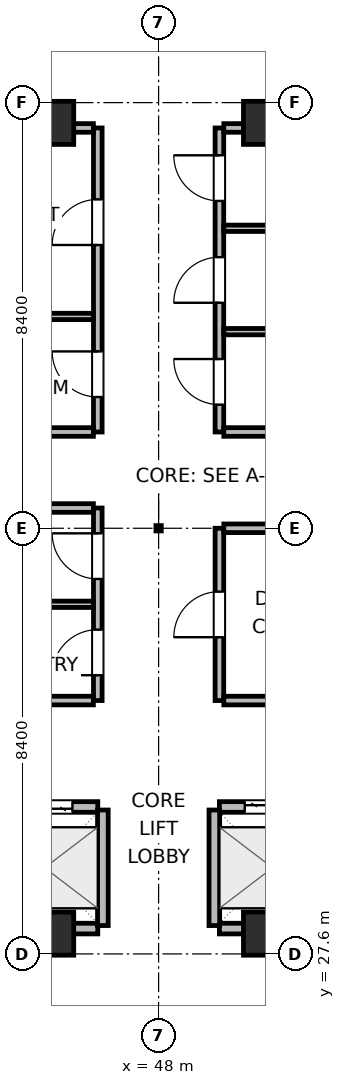
"""IFC4 building model, lengths in metres.
Left out: names, types, materials, properties, quantities, classifications, styles, units other than length and angle.
Written with IfcOpenShell. Run it as: python <this file> out.ifc"""

import sys

from ifc_helpers import new_model, si_unit, direction, frame, frame_2d, origin, origin_2d, place, context, subcontext, project, spatial, rectangle, extrude, element, fill, save


model = new_model("IFC4")
c1 = context("Model", 3, precision=1e-05, world=origin(), true_north=direction((0.0, 1.0)))
c2 = subcontext(c1, "Body", "Model", "MODEL_VIEW")
j1 = project(units=[si_unit("LENGTHUNIT", "METRE"), si_unit("PLANEANGLEUNIT", "RADIAN")], contexts=[c1])
p1 = place(None, origin())
s1 = spatial("IfcSite", under=j1, at=p1, CompositionType="ELEMENT")
p2 = place(p1, origin())
s2 = spatial("IfcBuilding", under=s1, at=p2, CompositionType="ELEMENT")
p3 = place(p2, frame((0.0, 0.0, 56.7)))
s3 = spatial("IfcBuildingStorey", under=s2, at=p3, CompositionType="ELEMENT", Elevation=56.7)
for number, where, z_axis, x_axis in (
    (1, (45.9, 28.0, 0.0), (0.0, 0.0, 1.0), (1.0, 0.0, 0.0)),
    (2, (50.1, 28.0, 0.0), (0.0, 0.0, 1.0), (1.0, 0.0, 0.0)),
    (3, (45.9, 44.0, 0.0), (0.0, 0.0, 1.0), (1.0, 0.0, 0.0)),
    (4, (50.1, 44.0, 0.0), (0.0, 0.0, 1.0), (1.0, 0.0, 0.0)),
):
    element("IfcColumn", number, at=place(p3, frame(where, z_axis=z_axis, x_axis=x_axis)), inside=s3, PredefinedType="COLUMN", context=c2, shape_type="SweptSolid", body=[
        extrude(rectangle(XDim=0.85, YDim=0.85, at=origin_2d()), origin(), (0.0, 0.0, 1.0), 3.9),
    ])
p4 = place(p3, frame((44.7, 30.5, 0.0), z_axis=(0.0, 0.0, 1.0), x_axis=(1.0, 0.0, 0.0)))
e5 = element("IfcWall", 5, at=p4, inside=s3, PredefinedType="PARTITIONING", context=c2, shape_type="SweptSolid", body=[
    extrude(rectangle(XDim=2.1, YDim=0.21, at=frame_2d((1.05, 0.0))), origin(), (0.0, 0.0, 1.0), 3.64),
])
p5 = place(p4, frame((0.5, 0.0, 0.0)))
e6 = element("IfcOpeningElement", 6, at=p5, cuts=e5, PredefinedType="OPENING", context=c2, shape_type="SweptSolid", body=[
    extrude(rectangle(XDim=1.1, YDim=2.04, at=frame_2d((0.55, 1.02))), frame((0.0, 0.115, 0.0), z_axis=(0.0, -1.0, 0.0), x_axis=(1.0, 0.0, 0.0)), (0.0, 0.0, 1.0), 0.23),
])
p6 = place(p3, frame((44.7, 28.1, 0.0), z_axis=(0.0, 0.0, 1.0), x_axis=(1.0, 0.0, 0.0)))
e7 = element("IfcWall", 7, at=p6, inside=s3, PredefinedType="PARTITIONING", context=c2, shape_type="SweptSolid", body=[
    extrude(rectangle(XDim=2.1, YDim=0.21, at=frame_2d((1.05, 0.0))), origin(), (0.0, 0.0, 1.0), 2.525),
])
p7 = place(p3, frame((46.9, 28.16, 0.0), z_axis=(0.0, 0.0, 1.0), x_axis=(0.0, 1.0, 0.0)))
e8 = element("IfcWall", 8, at=p7, inside=s3, PredefinedType="PARTITIONING", context=c2, shape_type="SweptSolid", body=[
    extrude(rectangle(XDim=2.28, YDim=0.21, at=frame_2d((1.14, 0.0))), origin(), (0.0, 0.0, 1.0), 3.64),
])
p8 = place(p3, frame((49.2, 30.5, 0.0), z_axis=(0.0, 0.0, 1.0), x_axis=(1.0, 0.0, 0.0)))
e9 = element("IfcWall", 9, at=p8, inside=s3, PredefinedType="PARTITIONING", context=c2, shape_type="SweptSolid", body=[
    extrude(rectangle(XDim=2.1, YDim=0.21, at=frame_2d((1.05, 0.0))), origin(), (0.0, 0.0, 1.0), 3.64),
])
p9 = place(p8, frame((0.5, 0.0, 0.0)))
e10 = element("IfcOpeningElement", 10, at=p9, cuts=e9, PredefinedType="OPENING", context=c2, shape_type="SweptSolid", body=[
    extrude(rectangle(XDim=1.1, YDim=2.04, at=frame_2d((0.55, 1.02))), frame((0.0, 0.115, 0.0), z_axis=(0.0, -1.0, 0.0), x_axis=(1.0, 0.0, 0.0)), (0.0, 0.0, 1.0), 0.23),
])
p10 = place(p3, frame((49.2, 28.1, 0.0), z_axis=(0.0, 0.0, 1.0), x_axis=(1.0, 0.0, 0.0)))
e11 = element("IfcWall", 11, at=p10, inside=s3, PredefinedType="PARTITIONING", context=c2, shape_type="SweptSolid", body=[
    extrude(rectangle(XDim=2.1, YDim=0.21, at=frame_2d((1.05, 0.0))), origin(), (0.0, 0.0, 1.0), 2.525),
])
p11 = place(p3, frame((49.1, 28.16, 0.0), z_axis=(0.0, 0.0, 1.0), x_axis=(0.0, 1.0, 0.0)))
e12 = element("IfcWall", 12, at=p11, inside=s3, PredefinedType="PARTITIONING", context=c2, shape_type="SweptSolid", body=[
    extrude(rectangle(XDim=2.28, YDim=0.21, at=frame_2d((1.14, 0.0))), origin(), (0.0, 0.0, 1.0), 3.64),
])
p12 = place(p3, frame((46.8, 32.6, 0.0), z_axis=(0.0, 0.0, 1.0), x_axis=(0.0, 1.0, 0.0)))
e13 = element("IfcWall", 13, at=p12, inside=s3, PredefinedType="PARTITIONING", context=c2, shape_type="SweptSolid", body=[
    extrude(rectangle(XDim=3.8, YDim=0.17, at=frame_2d((1.9, 0.0))), origin(), (0.0, 0.0, 1.0), 3.64),
])
p13 = place(p12, frame((0.5, 0.0, 0.0)))
e14 = element("IfcOpeningElement", 14, at=p13, cuts=e13, PredefinedType="OPENING", context=c2, shape_type="SweptSolid", body=[
    extrude(rectangle(XDim=0.9, YDim=2.02, at=frame_2d((0.45, 1.01))), frame((0.0, 0.095, 0.0), z_axis=(0.0, -1.0, 0.0), x_axis=(1.0, 0.0, 0.0)), (0.0, 0.0, 1.0), 0.19),
])
p14 = place(p12, frame((2.4, 0.0, 0.0)))
e15 = element("IfcOpeningElement", 15, at=p14, cuts=e13, PredefinedType="OPENING", context=c2, shape_type="SweptSolid", body=[
    extrude(rectangle(XDim=0.9, YDim=2.02, at=frame_2d((0.45, 1.01))), frame((0.0, 0.095, 0.0), z_axis=(0.0, -1.0, 0.0), x_axis=(1.0, 0.0, 0.0)), (0.0, 0.0, 1.0), 0.19),
])
for number, where, z_axis, x_axis in (
    (16, (43.8, 32.6, 0.0), (0.0, 0.0, 1.0), (1.0, 0.0, 0.0)),
    (17, (43.8, 36.4, 0.0), (0.0, 0.0, 1.0), (1.0, 0.0, 0.0)),
):
    element("IfcWall", number, at=place(p3, frame(where, z_axis=z_axis, x_axis=x_axis)), inside=s3, PredefinedType="PARTITIONING", context=c2, shape_type="SweptSolid", body=[
        extrude(rectangle(XDim=2.913, YDim=0.17, at=frame_2d((1.457, 0.0))), origin(), (0.0, 0.0, 1.0), 3.64),
    ])
p15 = place(p3, frame((43.8, 34.5, 0.0), z_axis=(0.0, 0.0, 1.0), x_axis=(1.0, 0.0, 0.0)))
e18 = element("IfcWall", 18, at=p15, inside=s3, PredefinedType="PARTITIONING", context=c2, shape_type="SweptSolid", body=[
    extrude(rectangle(XDim=2.913, YDim=0.125, at=frame_2d((1.457, 0.0))), origin(), (0.0, 0.0, 1.0), 3.64),
])
p16 = place(p3, frame((49.2, 32.6, 0.0), z_axis=(0.0, 0.0, 1.0), x_axis=(0.0, 1.0, 0.0)))
e19 = element("IfcWall", 19, at=p16, inside=s3, PredefinedType="PARTITIONING", context=c2, shape_type="SweptSolid", body=[
    extrude(rectangle(XDim=3.4, YDim=0.17, at=frame_2d((1.7, 0.0))), origin(), (0.0, 0.0, 1.0), 3.64),
])
p17 = place(p16, frame((1.25, 0.0, 0.0)))
e20 = element("IfcOpeningElement", 20, at=p17, cuts=e19, PredefinedType="OPENING", context=c2, shape_type="SweptSolid", body=[
    extrude(rectangle(XDim=0.9, YDim=2.02, at=frame_2d((0.45, 1.01))), frame((0.0, 0.095, 0.0), z_axis=(0.0, -1.0, 0.0), x_axis=(1.0, 0.0, 0.0)), (0.0, 0.0, 1.0), 0.19),
])
for number, where, z_axis, x_axis in (
    (21, (49.287, 32.6, 0.0), (0.0, 0.0, 1.0), (1.0, 0.0, 0.0)),
    (22, (49.287, 36.0, 0.0), (0.0, 0.0, 1.0), (1.0, 0.0, 0.0)),
):
    element("IfcWall", number, at=place(p3, frame(where, z_axis=z_axis, x_axis=x_axis)), inside=s3, PredefinedType="PARTITIONING", context=c2, shape_type="SweptSolid", body=[
        extrude(rectangle(XDim=2.913, YDim=0.17, at=frame_2d((1.457, 0.0))), origin(), (0.0, 0.0, 1.0), 3.64),
    ])
p18 = place(p3, frame((46.8, 37.9, 0.0), z_axis=(0.0, 0.0, 1.0), x_axis=(0.0, 1.0, 0.0)))
e23 = element("IfcWall", 23, at=p18, inside=s3, PredefinedType="PARTITIONING", context=c2, shape_type="SweptSolid", body=[
    extrude(rectangle(XDim=6.0, YDim=0.17, at=frame_2d((3.0, 0.0))), origin(), (0.0, 0.0, 1.0), 3.64),
])
p19 = place(p18, frame((0.69, 0.0, 0.0)))
e24 = element("IfcOpeningElement", 24, at=p19, cuts=e23, PredefinedType="OPENING", context=c2, shape_type="SweptSolid", body=[
    extrude(rectangle(XDim=0.9, YDim=2.02, at=frame_2d((0.45, 1.01))), frame((0.0, 0.095, 0.0), z_axis=(0.0, -1.0, 0.0), x_axis=(1.0, 0.0, 0.0)), (0.0, 0.0, 1.0), 0.19),
])
p20 = place(p18, frame((3.69, 0.0, 0.0)))
e25 = element("IfcOpeningElement", 25, at=p20, cuts=e23, PredefinedType="OPENING", context=c2, shape_type="SweptSolid", body=[
    extrude(rectangle(XDim=0.9, YDim=2.02, at=frame_2d((0.45, 1.01))), frame((0.0, 0.095, 0.0), z_axis=(0.0, -1.0, 0.0), x_axis=(1.0, 0.0, 0.0)), (0.0, 0.0, 1.0), 0.19),
])
p21 = place(p3, frame((42.5, 37.9, 0.0), z_axis=(0.0, 0.0, 1.0), x_axis=(1.0, 0.0, 0.0)))
e26 = element("IfcWall", 26, at=p21, inside=s3, PredefinedType="PARTITIONING", context=c2, shape_type="SweptSolid", body=[
    extrude(rectangle(XDim=4.213, YDim=0.17, at=frame_2d((2.106, 0.0))), origin(), (0.0, 0.0, 1.0), 3.64),
])
p22 = place(p3, frame((42.5, 43.9, 0.0), z_axis=(0.0, 0.0, 1.0), x_axis=(1.0, 0.0, 0.0)))
e27 = element("IfcWall", 27, at=p22, inside=s3, PredefinedType="PARTITIONING", context=c2, shape_type="SweptSolid", body=[
    extrude(rectangle(XDim=4.213, YDim=0.17, at=frame_2d((2.106, 0.0))), origin(), (0.0, 0.0, 1.0), 2.525),
])
p23 = place(p3, frame((42.5, 40.18, 0.0), z_axis=(0.0, 0.0, 1.0), x_axis=(1.0, 0.0, 0.0)))
e28 = element("IfcWall", 28, at=p23, inside=s3, PredefinedType="PARTITIONING", context=c2, shape_type="SweptSolid", body=[
    extrude(rectangle(XDim=4.213, YDim=0.125, at=frame_2d((2.106, 0.0))), origin(), (0.0, 0.0, 1.0), 3.64),
])
p24 = place(p3, frame((49.2, 37.9, 0.0), z_axis=(0.0, 0.0, 1.0), x_axis=(0.0, 1.0, 0.0)))
e29 = element("IfcWall", 29, at=p24, inside=s3, PredefinedType="PARTITIONING", context=c2, shape_type="SweptSolid", body=[
    extrude(rectangle(XDim=6.0, YDim=0.17, at=frame_2d((3.0, 0.0))), origin(), (0.0, 0.0, 1.0), 3.64),
])
p25 = place(p24, frame((0.54, 0.0, 0.0)))
e30 = element("IfcOpeningElement", 30, at=p25, cuts=e29, PredefinedType="OPENING", context=c2, shape_type="SweptSolid", body=[
    extrude(rectangle(XDim=0.9, YDim=2.02, at=frame_2d((0.45, 1.01))), frame((0.0, 0.095, 0.0), z_axis=(0.0, -1.0, 0.0), x_axis=(1.0, 0.0, 0.0)), (0.0, 0.0, 1.0), 0.19),
])
p26 = place(p24, frame((2.55, 0.0, 0.0)))
e31 = element("IfcOpeningElement", 31, at=p26, cuts=e29, PredefinedType="OPENING", context=c2, shape_type="SweptSolid", body=[
    extrude(rectangle(XDim=0.9, YDim=2.02, at=frame_2d((0.45, 1.01))), frame((0.0, 0.095, 0.0), z_axis=(0.0, -1.0, 0.0), x_axis=(1.0, 0.0, 0.0)), (0.0, 0.0, 1.0), 0.19),
])
p27 = place(p24, frame((4.56, 0.0, 0.0)))
e32 = element("IfcOpeningElement", 32, at=p27, cuts=e29, PredefinedType="OPENING", context=c2, shape_type="SweptSolid", body=[
    extrude(rectangle(XDim=0.9, YDim=2.02, at=frame_2d((0.45, 1.01))), frame((0.0, 0.095, 0.0), z_axis=(0.0, -1.0, 0.0), x_axis=(1.0, 0.0, 0.0)), (0.0, 0.0, 1.0), 0.19),
])
p28 = place(p3, frame((49.287, 37.9, 0.0), z_axis=(0.0, 0.0, 1.0), x_axis=(1.0, 0.0, 0.0)))
e33 = element("IfcWall", 33, at=p28, inside=s3, PredefinedType="PARTITIONING", context=c2, shape_type="SweptSolid", body=[
    extrude(rectangle(XDim=4.113, YDim=0.17, at=frame_2d((2.056, 0.0))), origin(), (0.0, 0.0, 1.0), 3.64),
])
p29 = place(p3, frame((49.287, 43.9, 0.0), z_axis=(0.0, 0.0, 1.0), x_axis=(1.0, 0.0, 0.0)))
e34 = element("IfcWall", 34, at=p29, inside=s3, PredefinedType="PARTITIONING", context=c2, shape_type="SweptSolid", body=[
    extrude(rectangle(XDim=4.113, YDim=0.17, at=frame_2d((2.056, 0.0))), origin(), (0.0, 0.0, 1.0), 2.525),
])
for number, where, z_axis, x_axis in (
    (35, (49.287, 39.88, 0.0), (0.0, 0.0, 1.0), (1.0, 0.0, 0.0)),
    (36, (49.287, 41.92, 0.0), (0.0, 0.0, 1.0), (1.0, 0.0, 0.0)),
):
    element("IfcWall", number, at=place(p3, frame(where, z_axis=z_axis, x_axis=x_axis)), inside=s3, PredefinedType="PARTITIONING", context=c2, shape_type="SweptSolid", body=[
        extrude(rectangle(XDim=4.113, YDim=0.125, at=frame_2d((2.056, 0.0))), origin(), (0.0, 0.0, 1.0), 3.64),
    ])
p30 = place(p5, origin())
e37 = element("IfcDoor", 37, at=p30, inside=s3, OperationType="DOUBLE_DOOR_SLIDING", PredefinedType="DOOR", context=c2, shape_type="SweptSolid", body=[
    extrude(rectangle(XDim=1.1, YDim=2.04, at=frame_2d((0.55, 1.02))), frame((0.0, 0.025, 0.0), z_axis=(0.0, -1.0, 0.0), x_axis=(1.0, 0.0, 0.0)), (0.0, 0.0, 1.0), 0.05),
])
fill(e6, e37)
p31 = place(p9, origin())
e38 = element("IfcDoor", 38, at=p31, inside=s3, OperationType="DOUBLE_DOOR_SLIDING", PredefinedType="DOOR", context=c2, shape_type="SweptSolid", body=[
    extrude(rectangle(XDim=1.1, YDim=2.04, at=frame_2d((0.55, 1.02))), frame((0.0, 0.025, 0.0), z_axis=(0.0, -1.0, 0.0), x_axis=(1.0, 0.0, 0.0)), (0.0, 0.0, 1.0), 0.05),
])
fill(e10, e38)
p32 = place(p13, origin())
e39 = element("IfcDoor", 39, at=p32, inside=s3, OperationType="SINGLE_SWING_LEFT", PredefinedType="DOOR", context=c2, shape_type="SweptSolid", body=[
    extrude(rectangle(XDim=0.9, YDim=2.02, at=frame_2d((0.45, 1.01))), frame((0.0, 0.025, 0.0), z_axis=(0.0, -1.0, 0.0), x_axis=(1.0, 0.0, 0.0)), (0.0, 0.0, 1.0), 0.05),
])
fill(e14, e39)
p33 = place(p14, origin())
e40 = element("IfcDoor", 40, at=p33, inside=s3, OperationType="SINGLE_SWING_RIGHT", PredefinedType="DOOR", context=c2, shape_type="SweptSolid", body=[
    extrude(rectangle(XDim=0.9, YDim=2.02, at=frame_2d((0.45, 1.01))), frame((0.0, 0.025, 0.0), z_axis=(0.0, -1.0, 0.0), x_axis=(1.0, 0.0, 0.0)), (0.0, 0.0, 1.0), 0.05),
])
fill(e15, e40)
p34 = place(p17, origin())
e41 = element("IfcDoor", 41, at=p34, inside=s3, OperationType="SINGLE_SWING_LEFT", PredefinedType="DOOR", context=c2, shape_type="SweptSolid", body=[
    extrude(rectangle(XDim=0.9, YDim=2.02, at=frame_2d((0.45, 1.01))), frame((0.0, 0.025, 0.0), z_axis=(0.0, -1.0, 0.0), x_axis=(1.0, 0.0, 0.0)), (0.0, 0.0, 1.0), 0.05),
])
fill(e20, e41)
p35 = place(p19, origin())
e42 = element("IfcDoor", 42, at=p35, inside=s3, OperationType="SINGLE_SWING_RIGHT", PredefinedType="DOOR", context=c2, shape_type="SweptSolid", body=[
    extrude(rectangle(XDim=0.9, YDim=2.02, at=frame_2d((0.45, 1.01))), frame((0.0, 0.025, 0.0), z_axis=(0.0, -1.0, 0.0), x_axis=(1.0, 0.0, 0.0)), (0.0, 0.0, 1.0), 0.05),
])
fill(e24, e42)
p36 = place(p20, origin())
e43 = element("IfcDoor", 43, at=p36, inside=s3, OperationType="SINGLE_SWING_LEFT", PredefinedType="DOOR", context=c2, shape_type="SweptSolid", body=[
    extrude(rectangle(XDim=0.9, YDim=2.02, at=frame_2d((0.45, 1.01))), frame((0.0, 0.025, 0.0), z_axis=(0.0, -1.0, 0.0), x_axis=(1.0, 0.0, 0.0)), (0.0, 0.0, 1.0), 0.05),
])
fill(e25, e43)
p37 = place(p25, origin())
e44 = element("IfcDoor", 44, at=p37, inside=s3, OperationType="SINGLE_SWING_RIGHT", PredefinedType="DOOR", context=c2, shape_type="SweptSolid", body=[
    extrude(rectangle(XDim=0.9, YDim=2.02, at=frame_2d((0.45, 1.01))), frame((0.0, 0.025, 0.0), z_axis=(0.0, -1.0, 0.0), x_axis=(1.0, 0.0, 0.0)), (0.0, 0.0, 1.0), 0.05),
])
fill(e30, e44)
p38 = place(p26, origin())
e45 = element("IfcDoor", 45, at=p38, inside=s3, OperationType="SINGLE_SWING_LEFT", PredefinedType="DOOR", context=c2, shape_type="SweptSolid", body=[
    extrude(rectangle(XDim=0.9, YDim=2.02, at=frame_2d((0.45, 1.01))), frame((0.0, 0.025, 0.0), z_axis=(0.0, -1.0, 0.0), x_axis=(1.0, 0.0, 0.0)), (0.0, 0.0, 1.0), 0.05),
])
fill(e31, e45)
p39 = place(p27, origin())
e46 = element("IfcDoor", 46, at=p39, inside=s3, OperationType="SINGLE_SWING_RIGHT", PredefinedType="DOOR", context=c2, shape_type="SweptSolid", body=[
    extrude(rectangle(XDim=0.9, YDim=2.02, at=frame_2d((0.45, 1.01))), frame((0.0, 0.025, 0.0), z_axis=(0.0, -1.0, 0.0), x_axis=(1.0, 0.0, 0.0)), (0.0, 0.0, 1.0), 0.05),
])
fill(e32, e46)
save(model, sys.argv[1])
